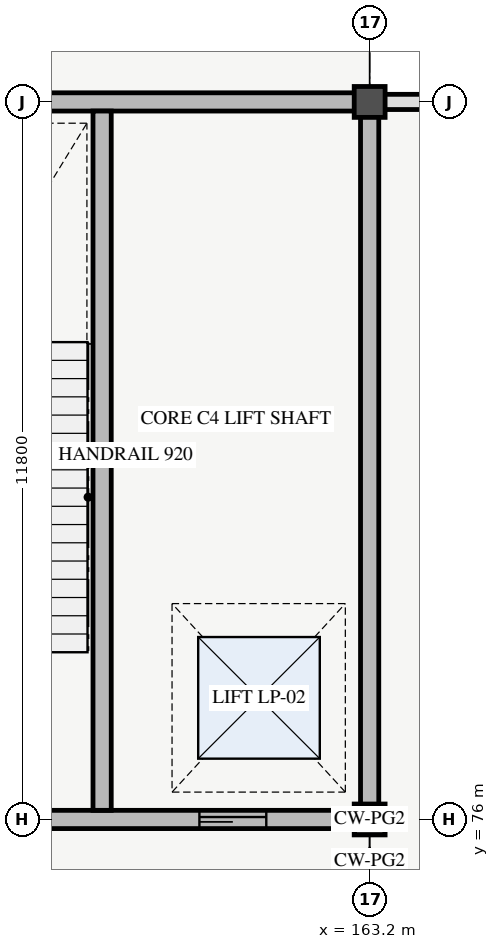
"""IFC4 building model, lengths in metres.
Left out: names, types, materials, properties, quantities, classifications, styles, units other than length and angle.
Written with IfcOpenShell. Run it as: python <this file> out.ifc"""

import sys

from ifc_helpers import new_model, si_unit, direction, frame, frame_2d, origin, origin_2d, place, context, subcontext, project, spatial, rectangle, hollow_circle, extrude, element, fill, save


model = new_model("IFC4")
c1 = context("Model", 3, precision=1e-05, world=origin(), true_north=direction((0.0, 1.0)))
c2 = subcontext(c1, "Body", "Model", "MODEL_VIEW")
j1 = project(units=[si_unit("LENGTHUNIT", "METRE"), si_unit("PLANEANGLEUNIT", "RADIAN")], contexts=[c1])
p1 = place(None, origin())
s1 = spatial("IfcSite", under=j1, at=p1, CompositionType="ELEMENT")
p2 = place(p1, origin())
s2 = spatial("IfcBuilding", under=s1, at=p2, CompositionType="ELEMENT")
p3 = place(p2, frame((0.0, 0.0, 5.4)))
s3 = spatial("IfcBuildingStorey", under=s2, at=p3, CompositionType="ELEMENT", Elevation=5.4)
for number, where, z_axis, x_axis in (
    (1, (163.2, 76.0, 0.0), (0.0, 0.0, 1.0), (1.0, 0.0, 0.0)),
    (2, (163.2, 87.8, 0.0), (0.0, 0.0, 1.0), (1.0, 0.0, 0.0)),
):
    element("IfcColumn", number, at=place(p3, frame(where, z_axis=z_axis, x_axis=x_axis)), inside=s3, PredefinedType="COLUMN", context=c2, shape_type="SweptSolid", body=[
        extrude(hollow_circle(Radius=0.254, WallThickness=0.02, at=origin_2d()), origin(), (0.0, 0.0, 1.0), 5.4),
    ])
p4 = place(p3, frame((153.0, 76.0, 0.0), z_axis=(0.0, 0.0, 1.0), x_axis=(1.0, 0.0, 0.0)))
e3 = element("IfcWall", 3, at=p4, inside=s3, PredefinedType="SHEAR", context=c2, shape_type="SweptSolid", body=[
    extrude(rectangle(XDim=10.2, YDim=0.3, at=frame_2d((5.1, 0.0))), origin(), (0.0, 0.0, 1.0), 5.4),
])
p5 = place(p4, frame((7.4, 0.0, 0.0)))
e4 = element("IfcOpeningElement", 4, at=p5, cuts=e3, PredefinedType="OPENING", context=c2, shape_type="SweptSolid", body=[
    extrude(rectangle(XDim=1.1, YDim=2.2, at=frame_2d((0.55, 1.1))), frame((0.0, 0.16, 0.0), z_axis=(0.0, -1.0, 0.0), x_axis=(1.0, 0.0, 0.0)), (0.0, 0.0, 1.0), 0.32),
])
p6 = place(p3, frame((153.0, 87.8, 0.0), z_axis=(0.0, 0.0, 1.0), x_axis=(1.0, 0.0, 0.0)))
e5 = element("IfcWall", 5, at=p6, inside=s3, PredefinedType="SHEAR", context=c2, shape_type="SweptSolid", body=[
    extrude(rectangle(XDim=10.2, YDim=0.3, at=frame_2d((5.1, 0.0))), origin(), (0.0, 0.0, 1.0), 5.4),
])
p7 = place(p3, frame((163.2, 76.0, 0.0), z_axis=(0.0, 0.0, 1.0), x_axis=(0.0, 1.0, 0.0)))
e6 = element("IfcWall", 6, at=p7, inside=s3, PredefinedType="SHEAR", context=c2, shape_type="SweptSolid", body=[
    extrude(rectangle(XDim=11.8, YDim=0.3, at=frame_2d((5.9, 0.0))), origin(), (0.0, 0.0, 1.0), 5.4),
])
p8 = place(p3, frame((163.44, 87.8, 0.0), z_axis=(0.0, 0.0, 1.0), x_axis=(1.0, 0.0, 0.0)))
e7 = element("IfcWall", 7, at=p8, inside=s3, PredefinedType="SOLIDWALL", context=c2, shape_type="SweptSolid", body=[
    extrude(rectangle(XDim=9.72, YDim=0.25, at=frame_2d((4.86, 0.0))), origin(), (0.0, 0.0, 1.0), 4.32),
])
p9 = place(p3, frame((158.8, 76.15, 0.0), z_axis=(0.0, 0.0, 1.0), x_axis=(0.0, 1.0, 0.0)))
e8 = element("IfcWall", 8, at=p9, inside=s3, PredefinedType="SHEAR", context=c2, shape_type="SweptSolid", body=[
    extrude(rectangle(XDim=11.5, YDim=0.3, at=frame_2d((5.75, 0.0))), origin(), (0.0, 0.0, 1.0), 5.4),
])
p10 = place(p5, origin())
e9 = element("IfcDoor", 9, at=p10, inside=s3, OperationType="SLIDING_TO_RIGHT", PredefinedType="DOOR", context=c2, shape_type="SweptSolid", body=[
    extrude(rectangle(XDim=1.1, YDim=2.2, at=frame_2d((0.55, 1.1))), frame((0.0, 0.025, 0.0), z_axis=(0.0, -1.0, 0.0), x_axis=(1.0, 0.0, 0.0)), (0.0, 0.0, 1.0), 0.05),
])
fill(e4, e9)
save(model, sys.argv[1])
